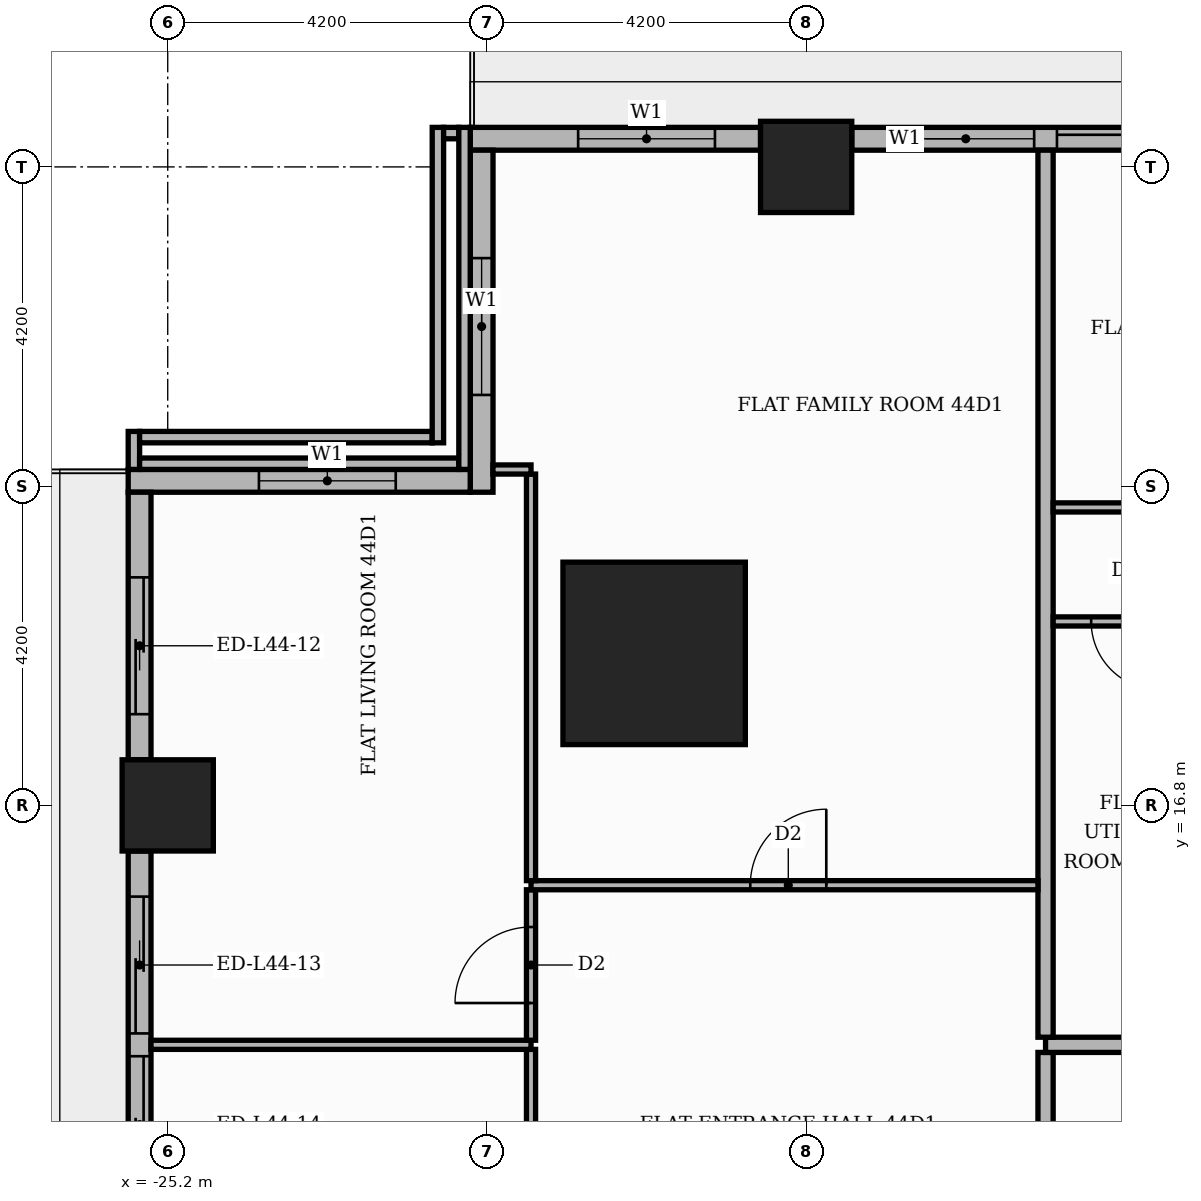
"""IFC4 building model, lengths in metres.
Left out: names, types, materials, properties, quantities, classifications, styles, units other than length and angle.
Written with IfcOpenShell. Run it as: python <this file> out.ifc"""

import sys

from ifc_helpers import new_model, si_unit, direction, frame, frame_2d, origin, origin_2d, place, context, subcontext, project, spatial, rectangle, extrude, element, fill, save


model = new_model("IFC4")
c1 = context("Model", 3, precision=1e-05, world=origin(), true_north=direction((0.0, 1.0)))
c2 = subcontext(c1, "Body", "Model", "MODEL_VIEW")
j1 = project(units=[si_unit("LENGTHUNIT", "METRE"), si_unit("PLANEANGLEUNIT", "RADIAN")], contexts=[c1])
p1 = place(None, origin())
s1 = spatial("IfcSite", under=j1, at=p1, CompositionType="ELEMENT")
p2 = place(p1, origin())
s2 = spatial("IfcBuilding", under=s1, at=p2, CompositionType="ELEMENT")
p3 = place(p2, frame((0.0, 0.0, 188.4)))
s3 = spatial("IfcBuildingStorey", under=s2, at=p3, CompositionType="ELEMENT", Elevation=188.4)
p4 = place(p3, frame((-18.8, 18.8, 0.0), z_axis=(0.0, 0.0, 1.0), x_axis=(1.0, 0.0, 0.0)))
e1 = element("IfcColumn", 1, at=p4, inside=s3, PredefinedType="COLUMN", context=c2, shape_type="SweptSolid", body=[
    extrude(rectangle(XDim=2.4, YDim=2.4, at=origin_2d()), origin(), (0.0, 0.0, 1.0), 3.9),
])
for number, where, z_axis, x_axis in (
    (2, (-16.8, 25.2, 0.0), (0.0, 0.0, 1.0), (1.0, 0.0, 0.0)),
    (3, (-25.2, 16.8, 0.0), (0.0, 0.0, 1.0), (1.0, 0.0, 0.0)),
):
    element("IfcColumn", number, at=place(p3, frame(where, z_axis=z_axis, x_axis=x_axis)), inside=s3, PredefinedType="COLUMN", context=c2, shape_type="SweptSolid", body=[
        extrude(rectangle(XDim=1.2, YDim=1.2, at=origin_2d()), origin(), (0.0, 0.0, 1.0), 3.9),
    ])
p5 = place(p3, frame((-9.0, 25.57, 0.0), z_axis=(0.0, 0.0, 1.0), x_axis=(-1.0, 0.0, 0.0)))
e4 = element("IfcWall", 4, at=p5, inside=s3, PredefinedType="STANDARD", context=c2, shape_type="SweptSolid", body=[
    extrude(rectangle(XDim=7.2, YDim=0.3, at=frame_2d((3.6, 0.0))), origin(), (0.0, 0.0, 1.0), 3.48),
])
p6 = place(p5, frame((0.6, 0.0, 0.0)))
e5 = element("IfcOpeningElement", 5, at=p6, cuts=e4, PredefinedType="OPENING", context=c2, shape_type="SweptSolid", body=[
    extrude(rectangle(XDim=3.9, YDim=2.4, at=frame_2d((1.95, 1.2))), frame((0.0, 0.16, 0.0), z_axis=(0.0, -1.0, 0.0), x_axis=(1.0, 0.0, 0.0)), (0.0, 0.0, 1.0), 0.32),
])
p7 = place(p5, frame((4.8, 0.0, 0.9)))
e6 = element("IfcOpeningElement", 6, at=p7, cuts=e4, PredefinedType="OPENING", context=c2, shape_type="SweptSolid", body=[
    extrude(rectangle(XDim=1.8, YDim=2.1, at=frame_2d((0.9, 1.05))), frame((0.0, 0.16, 0.0), z_axis=(0.0, -1.0, 0.0), x_axis=(1.0, 0.0, 0.0)), (0.0, 0.0, 1.0), 0.32),
])
p8 = place(p3, frame((-17.4, 25.57, 0.0), z_axis=(0.0, 0.0, 1.0), x_axis=(-1.0, 0.0, 0.0)))
e7 = element("IfcWall", 7, at=p8, inside=s3, PredefinedType="STANDARD", context=c2, shape_type="SweptSolid", body=[
    extrude(rectangle(XDim=3.82, YDim=0.3, at=frame_2d((1.91, 0.0))), origin(), (0.0, 0.0, 1.0), 3.48),
])
p9 = place(p8, frame((0.6, 0.0, 0.9)))
e8 = element("IfcOpeningElement", 8, at=p9, cuts=e7, PredefinedType="OPENING", context=c2, shape_type="SweptSolid", body=[
    extrude(rectangle(XDim=1.8, YDim=2.1, at=frame_2d((0.9, 1.05))), frame((0.0, 0.16, 0.0), z_axis=(0.0, -1.0, 0.0), x_axis=(1.0, 0.0, 0.0)), (0.0, 0.0, 1.0), 0.32),
])
p10 = place(p3, frame((-21.07, 25.42, 0.0), z_axis=(0.0, 0.0, 1.0), x_axis=(0.0, -1.0, 0.0)))
e9 = element("IfcWall", 9, at=p10, inside=s3, PredefinedType="STANDARD", context=c2, shape_type="SweptSolid", body=[
    extrude(rectangle(XDim=4.5, YDim=0.3, at=frame_2d((2.25, 0.0))), origin(), (0.0, 0.0, 1.0), 3.48),
])
p11 = place(p10, frame((1.42, 0.0, 0.9)))
e10 = element("IfcOpeningElement", 10, at=p11, cuts=e9, PredefinedType="OPENING", context=c2, shape_type="SweptSolid", body=[
    extrude(rectangle(XDim=1.8, YDim=2.1, at=frame_2d((0.9, 1.05))), frame((0.0, 0.16, 0.0), z_axis=(0.0, -1.0, 0.0), x_axis=(1.0, 0.0, 0.0)), (0.0, 0.0, 1.0), 0.32),
])
p12 = place(p3, frame((-21.22, 21.07, 0.0), z_axis=(0.0, 0.0, 1.0), x_axis=(-1.0, 0.0, 0.0)))
e11 = element("IfcWall", 11, at=p12, inside=s3, PredefinedType="STANDARD", context=c2, shape_type="SweptSolid", body=[
    extrude(rectangle(XDim=4.5, YDim=0.3, at=frame_2d((2.25, 0.0))), origin(), (0.0, 0.0, 1.0), 3.48),
])
p13 = place(p12, frame((0.98, 0.0, 0.9)))
e12 = element("IfcOpeningElement", 12, at=p13, cuts=e11, PredefinedType="OPENING", context=c2, shape_type="SweptSolid", body=[
    extrude(rectangle(XDim=1.8, YDim=2.1, at=frame_2d((0.9, 1.05))), frame((0.0, 0.16, 0.0), z_axis=(0.0, -1.0, 0.0), x_axis=(1.0, 0.0, 0.0)), (0.0, 0.0, 1.0), 0.32),
])
p14 = place(p3, frame((-25.57, 20.92, 0.0), z_axis=(0.0, 0.0, 1.0), x_axis=(0.0, -1.0, 0.0)))
e13 = element("IfcWall", 13, at=p14, inside=s3, PredefinedType="STANDARD", context=c2, shape_type="SweptSolid", body=[
    extrude(rectangle(XDim=3.52, YDim=0.3, at=frame_2d((1.76, 0.0))), origin(), (0.0, 0.0, 1.0), 3.48),
])
p15 = place(p14, frame((1.12, 0.0, 0.0)))
e14 = element("IfcOpeningElement", 14, at=p15, cuts=e13, PredefinedType="OPENING", context=c2, shape_type="SweptSolid", body=[
    extrude(rectangle(XDim=1.8, YDim=2.4, at=frame_2d((0.9, 1.2))), frame((0.0, 0.16, 0.0), z_axis=(0.0, -1.0, 0.0), x_axis=(1.0, 0.0, 0.0)), (0.0, 0.0, 1.0), 0.32),
])
p16 = place(p3, frame((-25.57, 16.2, 0.0), z_axis=(0.0, 0.0, 1.0), x_axis=(0.0, -1.0, 0.0)))
e15 = element("IfcWall", 15, at=p16, inside=s3, PredefinedType="STANDARD", context=c2, shape_type="SweptSolid", body=[
    extrude(rectangle(XDim=7.2, YDim=0.3, at=frame_2d((3.6, 0.0))), origin(), (0.0, 0.0, 1.0), 3.48),
])
p17 = place(p16, frame((0.6, 0.0, 0.0)))
e16 = element("IfcOpeningElement", 16, at=p17, cuts=e15, PredefinedType="OPENING", context=c2, shape_type="SweptSolid", body=[
    extrude(rectangle(XDim=1.8, YDim=2.4, at=frame_2d((0.9, 1.2))), frame((0.0, 0.16, 0.0), z_axis=(0.0, -1.0, 0.0), x_axis=(1.0, 0.0, 0.0)), (0.0, 0.0, 1.0), 0.32),
])
p18 = place(p16, frame((2.7, 0.0, 0.0)))
e17 = element("IfcOpeningElement", 17, at=p18, cuts=e15, PredefinedType="OPENING", context=c2, shape_type="SweptSolid", body=[
    extrude(rectangle(XDim=1.8, YDim=2.4, at=frame_2d((0.9, 1.2))), frame((0.0, 0.16, 0.0), z_axis=(0.0, -1.0, 0.0), x_axis=(1.0, 0.0, 0.0)), (0.0, 0.0, 1.0), 0.32),
])
p19 = place(p16, frame((4.8, 0.0, 0.9)))
e18 = element("IfcOpeningElement", 18, at=p19, cuts=e15, PredefinedType="OPENING", context=c2, shape_type="SweptSolid", body=[
    extrude(rectangle(XDim=1.8, YDim=2.1, at=frame_2d((0.9, 1.05))), frame((0.0, 0.16, 0.0), z_axis=(0.0, -1.0, 0.0), x_axis=(1.0, 0.0, 0.0)), (0.0, 0.0, 1.0), 0.32),
])
p20 = place(p3, frame((-25.645, 21.22, 0.0), z_axis=(0.0, 0.0, 1.0), x_axis=(0.0, 1.0, 0.0)))
e19 = element("IfcWall", 19, at=p20, inside=s3, PredefinedType="PARAPET", context=c2, shape_type="SweptSolid", body=[
    extrude(rectangle(XDim=0.5, YDim=0.15, at=frame_2d((0.25, 0.0))), origin(), (0.0, 0.0, 1.0), 1.1),
])
p21 = place(p3, frame((-25.57, 21.645, 0.0), z_axis=(0.0, 0.0, 1.0), x_axis=(1.0, 0.0, 0.0)))
e20 = element("IfcWall", 20, at=p21, inside=s3, PredefinedType="PARAPET", context=c2, shape_type="SweptSolid", body=[
    extrude(rectangle(XDim=3.85, YDim=0.15, at=frame_2d((1.925, 0.0))), origin(), (0.0, 0.0, 1.0), 1.1),
])
p22 = place(p3, frame((-25.57, 21.295, 0.0), z_axis=(0.0, 0.0, 1.0), x_axis=(1.0, 0.0, 0.0)))
e21 = element("IfcWall", 21, at=p22, inside=s3, PredefinedType="PARAPET", context=c2, shape_type="SweptSolid", body=[
    extrude(rectangle(XDim=4.2, YDim=0.15, at=frame_2d((2.1, 0.0))), origin(), (0.0, 0.0, 1.0), 1.1),
])
p23 = place(p3, frame((-21.645, 21.57, 0.0), z_axis=(0.0, 0.0, 1.0), x_axis=(0.0, 1.0, 0.0)))
e22 = element("IfcWall", 22, at=p23, inside=s3, PredefinedType="PARAPET", context=c2, shape_type="SweptSolid", body=[
    extrude(rectangle(XDim=4.15, YDim=0.15, at=frame_2d((2.075, 0.0))), origin(), (0.0, 0.0, 1.0), 1.1),
])
p24 = place(p3, frame((-21.57, 25.645, 0.0), z_axis=(0.0, 0.0, 1.0), x_axis=(1.0, 0.0, 0.0)))
e23 = element("IfcWall", 23, at=p24, inside=s3, PredefinedType="PARAPET", context=c2, shape_type="SweptSolid", body=[
    extrude(rectangle(XDim=0.2, YDim=0.15, at=frame_2d((0.1, 0.0))), origin(), (0.0, 0.0, 1.0), 1.1),
])
p25 = place(p3, frame((-21.295, 21.22, 0.0), z_axis=(0.0, 0.0, 1.0), x_axis=(0.0, 1.0, 0.0)))
e24 = element("IfcWall", 24, at=p25, inside=s3, PredefinedType="PARAPET", context=c2, shape_type="SweptSolid", body=[
    extrude(rectangle(XDim=4.5, YDim=0.15, at=frame_2d((2.25, 0.0))), origin(), (0.0, 0.0, 1.0), 1.1),
])
p26 = place(p3, frame((-13.65, 5.35, 0.0), z_axis=(0.0, 0.0, 1.0), x_axis=(0.0, 1.0, 0.0)))
e25 = element("IfcWall", 25, at=p26, inside=s3, PredefinedType="PARTITIONING", context=c2, shape_type="SweptSolid", body=[
    extrude(rectangle(XDim=8.2, YDim=0.2, at=frame_2d((4.1, 0.0))), origin(), (0.0, 0.0, 1.0), 3.48),
])
p27 = place(p26, frame((5.65, 0.0, 0.0)))
e26 = element("IfcOpeningElement", 26, at=p27, cuts=e25, PredefinedType="OPENING", context=c2, shape_type="SweptSolid", body=[
    extrude(rectangle(XDim=1.1, YDim=2.4, at=frame_2d((0.55, 1.2))), frame((0.0, 0.11, 0.0), z_axis=(0.0, -1.0, 0.0), x_axis=(1.0, 0.0, 0.0)), (0.0, 0.0, 1.0), 0.22),
])
p28 = place(p3, frame((-20.42, 9.51, 0.0), z_axis=(0.0, 0.0, 1.0), x_axis=(0.0, 1.0, 0.0)))
e27 = element("IfcWall", 27, at=p28, inside=s3, PredefinedType="PARTITIONING", context=c2, shape_type="SweptSolid", body=[
    extrude(rectangle(XDim=4.08, YDim=0.12, at=frame_2d((2.04, 0.0))), origin(), (0.0, 0.0, 1.0), 3.48),
])
p29 = place(p28, frame((1.59, 0.0, 0.0)))
e28 = element("IfcOpeningElement", 28, at=p29, cuts=e27, PredefinedType="OPENING", context=c2, shape_type="SweptSolid", body=[
    extrude(rectangle(XDim=0.9, YDim=2.1, at=frame_2d((0.45, 1.05))), frame((0.0, 0.07, 0.0), z_axis=(0.0, -1.0, 0.0), x_axis=(1.0, 0.0, 0.0)), (0.0, 0.0, 1.0), 0.14),
])
p30 = place(p3, frame((-25.42, 13.65, 0.0), z_axis=(0.0, 0.0, 1.0), x_axis=(1.0, 0.0, 0.0)))
e29 = element("IfcWall", 29, at=p30, inside=s3, PredefinedType="PARTITIONING", context=c2, shape_type="SweptSolid", body=[
    extrude(rectangle(XDim=5.0, YDim=0.12, at=frame_2d((2.5, 0.0))), origin(), (0.0, 0.0, 1.0), 3.48),
])
p31 = place(p3, frame((-13.65, 13.65, 0.0), z_axis=(0.0, 0.0, 1.0), x_axis=(1.0, 0.0, 0.0)))
e30 = element("IfcWall", 30, at=p31, inside=s3, PredefinedType="PARTITIONING", context=c2, shape_type="SweptSolid", body=[
    extrude(rectangle(XDim=39.07, YDim=0.2, at=frame_2d((19.535, 0.0))), origin(), (0.0, 0.0, 1.0), 3.48),
])
p32 = place(p31, frame((24.65, 0.0, 0.0)))
e31 = element("IfcOpeningElement", 31, at=p32, cuts=e30, PredefinedType="OPENING", context=c2, shape_type="SweptSolid", body=[
    extrude(rectangle(XDim=1.1, YDim=2.4, at=frame_2d((0.55, 1.2))), frame((0.0, 0.11, 0.0), z_axis=(0.0, -1.0, 0.0), x_axis=(1.0, 0.0, 0.0)), (0.0, 0.0, 1.0), 0.22),
])
p33 = place(p31, frame((12.05, 0.0, 0.0)))
e32 = element("IfcOpeningElement", 32, at=p33, cuts=e30, PredefinedType="OPENING", context=c2, shape_type="SweptSolid", body=[
    extrude(rectangle(XDim=1.1, YDim=2.4, at=frame_2d((0.55, 1.2))), frame((0.0, 0.11, 0.0), z_axis=(0.0, -1.0, 0.0), x_axis=(1.0, 0.0, 0.0)), (0.0, 0.0, 1.0), 0.22),
])
p34 = place(p3, frame((-20.42, 13.71, 0.0), z_axis=(0.0, 0.0, 1.0), x_axis=(0.0, 1.0, 0.0)))
e33 = element("IfcWall", 33, at=p34, inside=s3, PredefinedType="PARTITIONING", context=c2, shape_type="SweptSolid", body=[
    extrude(rectangle(XDim=1.98, YDim=0.12, at=frame_2d((0.99, 0.0))), origin(), (0.0, 0.0, 1.0), 3.48),
])
p35 = place(p34, frame((0.49, 0.0, 0.0)))
e34 = element("IfcOpeningElement", 34, at=p35, cuts=e33, PredefinedType="OPENING", context=c2, shape_type="SweptSolid", body=[
    extrude(rectangle(XDim=1.0, YDim=2.1, at=frame_2d((0.5, 1.05))), frame((0.0, 0.07, 0.0), z_axis=(0.0, -1.0, 0.0), x_axis=(1.0, 0.0, 0.0)), (0.0, 0.0, 1.0), 0.14),
])
p36 = place(p3, frame((-13.65, 13.75, 0.0), z_axis=(0.0, 0.0, 1.0), x_axis=(0.0, 1.0, 0.0)))
e35 = element("IfcWall", 35, at=p36, inside=s3, PredefinedType="PARTITIONING", context=c2, shape_type="SweptSolid", body=[
    extrude(rectangle(XDim=11.67, YDim=0.2, at=frame_2d((5.835, 0.0))), origin(), (0.0, 0.0, 1.0), 3.48),
])
p37 = place(p3, frame((-20.42, 15.75, 0.0), z_axis=(0.0, 0.0, 1.0), x_axis=(1.0, 0.0, 0.0)))
e36 = element("IfcWall", 36, at=p37, inside=s3, PredefinedType="PARTITIONING", context=c2, shape_type="SweptSolid", body=[
    extrude(rectangle(XDim=6.67, YDim=0.12, at=frame_2d((3.335, 0.0))), origin(), (0.0, 0.0, 1.0), 3.48),
])
p38 = place(p37, frame((2.885, 0.0, 0.0)))
e37 = element("IfcOpeningElement", 37, at=p38, cuts=e36, PredefinedType="OPENING", context=c2, shape_type="SweptSolid", body=[
    extrude(rectangle(XDim=1.0, YDim=2.1, at=frame_2d((0.5, 1.05))), frame((0.0, 0.07, 0.0), z_axis=(0.0, -1.0, 0.0), x_axis=(1.0, 0.0, 0.0)), (0.0, 0.0, 1.0), 0.14),
])
p39 = place(p3, frame((-20.42, 15.81, 0.0), z_axis=(0.0, 0.0, 1.0), x_axis=(0.0, 1.0, 0.0)))
e38 = element("IfcWall", 38, at=p39, inside=s3, PredefinedType="PARTITIONING", context=c2, shape_type="SweptSolid", body=[
    extrude(rectangle(XDim=5.349, YDim=0.12, at=frame_2d((2.674, 0.0))), origin(), (0.0, 0.0, 1.0), 3.48),
])
p40 = place(p3, frame((-13.55, 19.22, 0.0), z_axis=(0.0, 0.0, 1.0), x_axis=(1.0, 0.0, 0.0)))
e39 = element("IfcWall", 39, at=p40, inside=s3, PredefinedType="PARTITIONING", context=c2, shape_type="SweptSolid", body=[
    extrude(rectangle(XDim=10.4, YDim=0.12, at=frame_2d((5.2, 0.0))), origin(), (0.0, 0.0, 1.0), 3.48),
])
p41 = place(p40, frame((6.8, 0.0, 0.0)))
e40 = element("IfcOpeningElement", 40, at=p41, cuts=e39, PredefinedType="OPENING", context=c2, shape_type="SweptSolid", body=[
    extrude(rectangle(XDim=0.9, YDim=2.1, at=frame_2d((0.45, 1.05))), frame((0.0, 0.07, 0.0), z_axis=(0.0, -1.0, 0.0), x_axis=(1.0, 0.0, 0.0)), (0.0, 0.0, 1.0), 0.14),
])
p42 = place(p40, frame((2.6, 0.0, 0.0)))
e41 = element("IfcOpeningElement", 41, at=p42, cuts=e39, PredefinedType="OPENING", context=c2, shape_type="SweptSolid", body=[
    extrude(rectangle(XDim=0.9, YDim=2.1, at=frame_2d((0.45, 1.05))), frame((0.0, 0.07, 0.0), z_axis=(0.0, -1.0, 0.0), x_axis=(1.0, 0.0, 0.0)), (0.0, 0.0, 1.0), 0.14),
])
p43 = place(p40, frame((0.5, 0.0, 0.0)))
e42 = element("IfcOpeningElement", 42, at=p43, cuts=e39, PredefinedType="OPENING", context=c2, shape_type="SweptSolid", body=[
    extrude(rectangle(XDim=0.9, YDim=2.1, at=frame_2d((0.45, 1.05))), frame((0.0, 0.07, 0.0), z_axis=(0.0, -1.0, 0.0), x_axis=(1.0, 0.0, 0.0)), (0.0, 0.0, 1.0), 0.14),
])
p44 = place(p3, frame((-13.55, 20.72, 0.0), z_axis=(0.0, 0.0, 1.0), x_axis=(1.0, 0.0, 0.0)))
e43 = element("IfcWall", 43, at=p44, inside=s3, PredefinedType="PARTITIONING", context=c2, shape_type="SweptSolid", body=[
    extrude(rectangle(XDim=18.7, YDim=0.12, at=frame_2d((9.35, 0.0))), origin(), (0.0, 0.0, 1.0), 3.48),
])
p45 = place(p44, frame((14.15, 0.0, 0.0)))
e44 = element("IfcOpeningElement", 44, at=p45, cuts=e43, PredefinedType="OPENING", context=c2, shape_type="SweptSolid", body=[
    extrude(rectangle(XDim=0.9, YDim=2.1, at=frame_2d((0.45, 1.05))), frame((0.0, 0.07, 0.0), z_axis=(0.0, -1.0, 0.0), x_axis=(1.0, 0.0, 0.0)), (0.0, 0.0, 1.0), 0.14),
])
p46 = place(p44, frame((2.55, 0.0, 0.0)))
e45 = element("IfcOpeningElement", 45, at=p46, cuts=e43, PredefinedType="OPENING", context=c2, shape_type="SweptSolid", body=[
    extrude(rectangle(XDim=1.0, YDim=2.1, at=frame_2d((0.5, 1.05))), frame((0.0, 0.07, 0.0), z_axis=(0.0, -1.0, 0.0), x_axis=(1.0, 0.0, 0.0)), (0.0, 0.0, 1.0), 0.14),
])
p47 = place(p3, frame((-20.921, 21.219, 0.0), z_axis=(0.0, 0.0, 1.0), x_axis=(1.0, 0.0, 0.0)))
e46 = element("IfcWall", 46, at=p47, inside=s3, PredefinedType="PARTITIONING", context=c2, shape_type="SweptSolid", body=[
    extrude(rectangle(XDim=0.501, YDim=0.12, at=frame_2d((0.25, 0.0))), origin(), (0.0, 0.0, 1.0), 3.48),
])
p48 = place(p6, origin())
e47 = element("IfcDoor", 47, at=p48, inside=s3, OperationType="SLIDING_TO_LEFT", PredefinedType="DOOR", context=c2, shape_type="SweptSolid", body=[
    extrude(rectangle(XDim=3.9, YDim=2.4, at=frame_2d((1.95, 1.2))), frame((0.0, 0.025, 0.0), z_axis=(0.0, -1.0, 0.0), x_axis=(1.0, 0.0, 0.0)), (0.0, 0.0, 1.0), 0.05),
])
fill(e5, e47)
p49 = place(p7, origin())
e48 = element("IfcWindow", 48, at=p49, inside=s3, PartitioningType="SINGLE_PANEL", PredefinedType="WINDOW", context=c2, shape_type="SweptSolid", body=[
    extrude(rectangle(XDim=1.8, YDim=2.1, at=frame_2d((0.9, 1.05))), frame((0.0, 0.03, 0.0), z_axis=(0.0, -1.0, 0.0), x_axis=(1.0, 0.0, 0.0)), (0.0, 0.0, 1.0), 0.06),
])
fill(e6, e48)
p50 = place(p9, origin())
e49 = element("IfcWindow", 49, at=p50, inside=s3, PartitioningType="SINGLE_PANEL", PredefinedType="WINDOW", context=c2, shape_type="SweptSolid", body=[
    extrude(rectangle(XDim=1.8, YDim=2.1, at=frame_2d((0.9, 1.05))), frame((0.0, 0.03, 0.0), z_axis=(0.0, -1.0, 0.0), x_axis=(1.0, 0.0, 0.0)), (0.0, 0.0, 1.0), 0.06),
])
fill(e8, e49)
p51 = place(p11, origin())
e50 = element("IfcWindow", 50, at=p51, inside=s3, PartitioningType="SINGLE_PANEL", PredefinedType="WINDOW", context=c2, shape_type="SweptSolid", body=[
    extrude(rectangle(XDim=1.8, YDim=2.1, at=frame_2d((0.9, 1.05))), frame((0.0, 0.03, 0.0), z_axis=(0.0, -1.0, 0.0), x_axis=(1.0, 0.0, 0.0)), (0.0, 0.0, 1.0), 0.06),
])
fill(e10, e50)
p52 = place(p13, origin())
e51 = element("IfcWindow", 51, at=p52, inside=s3, PartitioningType="SINGLE_PANEL", PredefinedType="WINDOW", context=c2, shape_type="SweptSolid", body=[
    extrude(rectangle(XDim=1.8, YDim=2.1, at=frame_2d((0.9, 1.05))), frame((0.0, 0.03, 0.0), z_axis=(0.0, -1.0, 0.0), x_axis=(1.0, 0.0, 0.0)), (0.0, 0.0, 1.0), 0.06),
])
fill(e12, e51)
p53 = place(p15, origin())
e52 = element("IfcDoor", 52, at=p53, inside=s3, OperationType="SLIDING_TO_RIGHT", PredefinedType="DOOR", context=c2, shape_type="SweptSolid", body=[
    extrude(rectangle(XDim=1.8, YDim=2.4, at=frame_2d((0.9, 1.2))), frame((0.0, 0.025, 0.0), z_axis=(0.0, -1.0, 0.0), x_axis=(1.0, 0.0, 0.0)), (0.0, 0.0, 1.0), 0.05),
])
fill(e14, e52)
p54 = place(p17, origin())
e53 = element("IfcDoor", 53, at=p54, inside=s3, OperationType="SLIDING_TO_LEFT", PredefinedType="DOOR", context=c2, shape_type="SweptSolid", body=[
    extrude(rectangle(XDim=1.8, YDim=2.4, at=frame_2d((0.9, 1.2))), frame((0.0, 0.025, 0.0), z_axis=(0.0, -1.0, 0.0), x_axis=(1.0, 0.0, 0.0)), (0.0, 0.0, 1.0), 0.05),
])
fill(e16, e53)
p55 = place(p18, origin())
e54 = element("IfcDoor", 54, at=p55, inside=s3, OperationType="SLIDING_TO_RIGHT", PredefinedType="DOOR", context=c2, shape_type="SweptSolid", body=[
    extrude(rectangle(XDim=1.8, YDim=2.4, at=frame_2d((0.9, 1.2))), frame((0.0, 0.025, 0.0), z_axis=(0.0, -1.0, 0.0), x_axis=(1.0, 0.0, 0.0)), (0.0, 0.0, 1.0), 0.05),
])
fill(e17, e54)
p56 = place(p43, frame((0.9, 0.0, 0.0), z_axis=(0.0, 0.0, 1.0), x_axis=(-1.0, 0.0, 0.0)))
e55 = element("IfcDoor", 55, at=p56, inside=s3, OperationType="SINGLE_SWING_RIGHT", PredefinedType="DOOR", context=c2, shape_type="SweptSolid", body=[
    extrude(rectangle(XDim=0.9, YDim=2.1, at=frame_2d((0.45, 1.05))), frame((0.0, 0.025, 0.0), z_axis=(0.0, -1.0, 0.0), x_axis=(1.0, 0.0, 0.0)), (0.0, 0.0, 1.0), 0.05),
])
fill(e42, e55)
p57 = place(p38, origin())
e56 = element("IfcDoor", 56, at=p57, inside=s3, OperationType="SINGLE_SWING_RIGHT", PredefinedType="DOOR", context=c2, shape_type="SweptSolid", body=[
    extrude(rectangle(XDim=1.0, YDim=2.1, at=frame_2d((0.5, 1.05))), frame((0.0, 0.025, 0.0), z_axis=(0.0, -1.0, 0.0), x_axis=(1.0, 0.0, 0.0)), (0.0, 0.0, 1.0), 0.05),
])
fill(e37, e56)
p58 = place(p35, origin())
e57 = element("IfcDoor", 57, at=p58, inside=s3, OperationType="SINGLE_SWING_LEFT", PredefinedType="DOOR", context=c2, shape_type="SweptSolid", body=[
    extrude(rectangle(XDim=1.0, YDim=2.1, at=frame_2d((0.5, 1.05))), frame((0.0, 0.025, 0.0), z_axis=(0.0, -1.0, 0.0), x_axis=(1.0, 0.0, 0.0)), (0.0, 0.0, 1.0), 0.05),
])
fill(e34, e57)
save(model, sys.argv[1])
